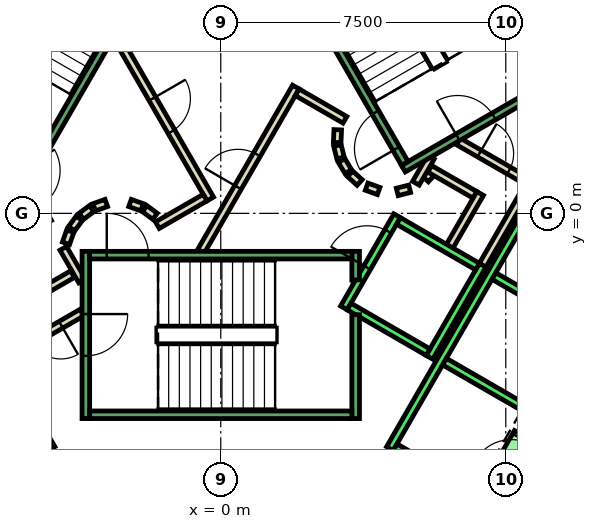
"""IFC4 building model, lengths in metres.
Left out: names, types, materials, properties, quantities, classifications, styles, units other than length and angle.
Written with IfcOpenShell. Run it as: python <this file> out.ifc"""

import sys

from ifc_helpers import new_model, si_unit, direction, frame, frame_2d, origin, place, context, subcontext, project, spatial, polyline, rectangle, outline, extrude, element, fill, save


model = new_model("IFC4")
c1 = context("Model", 3, precision=1e-05, world=origin(), true_north=direction((0.0, 1.0)))
c2 = subcontext(c1, "Body", "Model", "MODEL_VIEW")
j1 = project(units=[si_unit("LENGTHUNIT", "METRE"), si_unit("PLANEANGLEUNIT", "RADIAN")], contexts=[c1])
p1 = place(None, origin())
s1 = spatial("IfcSite", under=j1, at=p1, CompositionType="ELEMENT")
p2 = place(p1, origin())
s2 = spatial("IfcBuilding", under=s1, at=p2, CompositionType="ELEMENT")
p3 = place(p2, frame((0.0, 0.0, 72.8)))
s3 = spatial("IfcBuildingStorey", under=s2, at=p3, CompositionType="ELEMENT", Elevation=72.8)
p4 = place(p3, frame((0.0, 0.0, -0.4)))
e1 = element("IfcWall", 1, at=p4, inside=s3, PredefinedType="SHEAR", context=c2, shape_type="SweptSolid", body=[
    extrude(outline(polyline([(8.517, 11.748), (7.694, 11.273), (12.759, 2.5), (13.856, 2.5), (8.517, 11.748)])), origin(), (0.0, 0.0, 1.0), 4.2),
])
p5 = place(p3, frame((0.0, 0.0, 3.6)))
e2 = element("IfcWall", 2, at=p5, inside=s3, PredefinedType="SHEAR", context=c2, shape_type="SweptSolid", body=[
    extrude(outline(polyline([(8.767, -6.314), (7.945, -5.839), (7.295, -6.965), (8.117, -7.44), (8.767, -6.314)])), origin(), (0.0, 0.0, 1.0), 0.2),
])
p6 = place(p3, frame((5.39, 0.898, 0.0), z_axis=(0.0, 0.0, 1.0), x_axis=(0.673828488714, 0.738887791073, 0.0)))
e3 = element("IfcWall", 3, at=p6, inside=s3, PredefinedType="PARTITIONING", context=c2, shape_type="SweptSolid", body=[
    extrude(rectangle(XDim=0.263, YDim=0.2, at=frame_2d((0.131, 0.0))), origin(), (0.0, 0.0, 1.0), 3.8),
])
p7 = place(p3, frame((5.499, 1.172, 0.0), z_axis=(0.0, 0.0, 1.0), x_axis=(0.866333505267, -0.499465972466, 0.0)))
e4 = element("IfcWall", 4, at=p7, inside=s3, PredefinedType="PARTITIONING", context=c2, shape_type="SweptSolid", body=[
    extrude(rectangle(XDim=1.374, YDim=0.2, at=frame_2d((0.687, 0.0))), origin(), (0.0, 0.0, 1.0), 3.8),
])
p8 = place(p3, frame((6.826, 0.522, 0.0), z_axis=(0.0, 0.0, 1.0), x_axis=(-0.500016722714, -0.866015748706, 0.0)))
e5 = element("IfcWall", 5, at=p8, inside=s3, PredefinedType="PARTITIONING", context=c2, shape_type="SweptSolid", body=[
    extrude(rectangle(XDim=1.7, YDim=0.2, at=frame_2d((0.85, 0.0))), origin(), (0.0, 0.0, 1.0), 3.8),
])
p9 = place(p3, frame((6.25, 1.894, 0.0), z_axis=(0.0, 0.0, 1.0), x_axis=(0.866043184279, -0.499969202016, 0.0)))
e6 = element("IfcWall", 6, at=p9, inside=s3, PredefinedType="PARTITIONING", context=c2, shape_type="SweptSolid", body=[
    extrude(rectangle(XDim=2.084, YDim=0.2, at=frame_2d((1.042, 0.0))), origin(), (0.0, 0.0, 1.0), 3.8),
])
p10 = place(p9, frame((0.642, 0.0, 0.0)))
e7 = element("IfcOpeningElement", 7, at=p10, cuts=e6, PredefinedType="OPENING", context=c2, shape_type="SweptSolid", body=[
    extrude(rectangle(XDim=0.9, YDim=2.1, at=frame_2d((0.45, 1.05))), frame((0.0, 0.11, 0.0), z_axis=(0.0, -1.0, 0.0), x_axis=(1.0, 0.0, 0.0)), (0.0, 0.0, 1.0), 0.22),
])
p11 = place(p3, frame((8.192, 0.888, 0.0), z_axis=(0.0, 0.0, 1.0), x_axis=(-0.499940625693, -0.866059680843, 0.0)))
e8 = element("IfcWall", 8, at=p11, inside=s3, PredefinedType="PARTITIONING", context=c2, shape_type="SweptSolid", body=[
    extrude(rectangle(XDim=2.68, YDim=0.2, at=frame_2d((1.34, 0.0))), origin(), (0.0, 0.0, 1.0), 3.8),
])
p12 = place(p3, frame((5.135, 0.793, 0.0), z_axis=(0.0, 0.0, 1.0), x_axis=(0.499526442893, 0.866298639529, 0.0)))
e9 = element("IfcWall", 9, at=p12, inside=s3, PredefinedType="PARTITIONING", context=c2, shape_type="SweptSolid", body=[
    extrude(rectangle(XDim=0.791, YDim=0.2, at=frame_2d((0.396, 0.0))), origin(), (0.0, 0.0, 1.0), 3.8),
])
p13 = place(p3, frame((-3.9, -1.599, 0.0), z_axis=(0.0, 0.0, 1.0), x_axis=(-0.865969445389, -0.500096910261, 0.0)))
e10 = element("IfcWall", 10, at=p13, inside=s3, PredefinedType="PARTITIONING", context=c2, shape_type="SweptSolid", body=[
    extrude(rectangle(XDim=1.373, YDim=0.2, at=frame_2d((0.687, 0.0))), origin(), (0.0, 0.0, 1.0), 3.8),
])
p14 = place(p3, frame((-3.65, -2.61, 0.0), z_axis=(0.0, 0.0, 1.0), x_axis=(-0.866072462134, -0.499918483688, 0.0)))
e11 = element("IfcWall", 11, at=p14, inside=s3, PredefinedType="PARTITIONING", context=c2, shape_type="SweptSolid", body=[
    extrude(rectangle(XDim=2.084, YDim=0.2, at=frame_2d((1.042, 0.0))), origin(), (0.0, 0.0, 1.0), 3.8),
])
p15 = place(p14, frame((0.642, 0.0, 0.0)))
e12 = element("IfcOpeningElement", 12, at=p15, cuts=e11, PredefinedType="OPENING", context=c2, shape_type="SweptSolid", body=[
    extrude(rectangle(XDim=0.9, YDim=2.1, at=frame_2d((0.45, 1.05))), frame((0.0, 0.11, 0.0), z_axis=(0.0, -1.0, 0.0), x_axis=(1.0, 0.0, 0.0)), (0.0, 0.0, 1.0), 0.22),
])
p16 = place(p3, frame((-4.145, -0.92, 0.0), z_axis=(0.0, 0.0, 1.0), x_axis=(0.499743786207, -0.866173278362, 0.0)))
e13 = element("IfcWall", 13, at=p16, inside=s3, PredefinedType="PARTITIONING", context=c2, shape_type="SweptSolid", body=[
    extrude(rectangle(XDim=0.991, YDim=0.2, at=frame_2d((0.495, 0.0))), origin(), (0.0, 0.0, 1.0), 3.8),
])
p17 = place(p3, frame((-0.52, -1.0, 0.0), z_axis=(0.0, 0.0, 1.0), x_axis=(0.50011622646, 0.865958290007, 0.0)))
e14 = element("IfcWall", 14, at=p17, inside=s3, PredefinedType="PARTITIONING", context=c2, shape_type="SweptSolid", body=[
    extrude(rectangle(XDim=4.991, YDim=0.2, at=frame_2d((2.496, 0.0))), origin(), (0.0, 0.0, 1.0), 3.8),
])
p18 = place(p17, frame((1.945, 0.0, 0.0)))
e15 = element("IfcOpeningElement", 15, at=p18, cuts=e14, PredefinedType="OPENING", context=c2, shape_type="SweptSolid", body=[
    extrude(rectangle(XDim=1.0, YDim=2.1, at=frame_2d((0.5, 1.05))), frame((0.0, 0.11, 0.0), z_axis=(0.0, -1.0, 0.0), x_axis=(1.0, 0.0, 0.0)), (0.0, 0.0, 1.0), 0.22),
])
p19 = place(p3, frame((2.012, 3.186, 0.0), z_axis=(0.0, 0.0, 1.0), x_axis=(0.865891012941, -0.500232699559, 0.0)))
e16 = element("IfcWall", 16, at=p19, inside=s3, PredefinedType="PARTITIONING", context=c2, shape_type="SweptSolid", body=[
    extrude(rectangle(XDim=1.449, YDim=0.2, at=frame_2d((0.725, 0.0))), origin(), (0.0, 0.0, 1.0), 3.8),
])
p20 = place(p3, frame((3.079, 2.199, 0.0), z_axis=(0.0, 0.0, 1.0), x_axis=(-0.047771483479, -0.998858290933, 0.0)))
e17 = element("IfcWall", 17, at=p20, inside=s3, PredefinedType="PARTITIONING", context=c2, shape_type="SweptSolid", body=[
    extrude(rectangle(XDim=0.337, YDim=0.2, at=frame_2d((0.169, 0.0))), origin(), (0.0, 0.0, 1.0), 3.8),
])
p21 = place(p3, frame((3.07, 1.786, 0.0), z_axis=(0.0, 0.0, 1.0), x_axis=(0.242705583207, -0.970099994784, 0.0)))
e18 = element("IfcWall", 18, at=p21, inside=s3, PredefinedType="PARTITIONING", context=c2, shape_type="SweptSolid", body=[
    extrude(rectangle(XDim=0.338, YDim=0.2, at=frame_2d((0.169, 0.0))), origin(), (0.0, 0.0, 1.0), 3.8),
])
for number, where, z_axis, x_axis in (
    (19, (3.182, 1.388, 0.0), (0.0, 0.0, 1.0), (0.512, -0.859, 0.0)),
    (20, (3.404, 1.039, 0.0), (0.0, 0.0, 1.0), (0.74, -0.672, 0.0)),
):
    element("IfcWall", number, at=place(p3, frame(where, z_axis=z_axis, x_axis=x_axis)), inside=s3, PredefinedType="PARTITIONING", context=c2, shape_type="SweptSolid", body=[
        extrude(rectangle(XDim=0.338, YDim=0.2, at=frame_2d((0.169, 0.0))), origin(), (0.0, 0.0, 1.0), 3.8),
    ])
p22 = place(p3, frame((3.838, 0.702, 0.0), z_axis=(0.0, 0.0, 1.0), x_axis=(0.941035081519, -0.338308993895, 0.0)))
e21 = element("IfcWall", 21, at=p22, inside=s3, PredefinedType="PARTITIONING", context=c2, shape_type="SweptSolid", body=[
    extrude(rectangle(XDim=0.337, YDim=0.2, at=frame_2d((0.168, 0.0))), origin(), (0.0, 0.0, 1.0), 3.8),
])
p23 = place(p3, frame((4.644, 0.564, 0.0), z_axis=(0.0, 0.0, 1.0), x_axis=(0.969929076366, 0.243387729394, 0.0)))
e22 = element("IfcWall", 22, at=p23, inside=s3, PredefinedType="PARTITIONING", context=c2, shape_type="SweptSolid", body=[
    extrude(rectangle(XDim=0.337, YDim=0.2, at=frame_2d((0.168, 0.0))), origin(), (0.0, 0.0, 1.0), 3.8),
])
p24 = place(p3, frame((-2.771, 4.7, 0.0), z_axis=(0.0, 0.0, 1.0), x_axis=(0.499969479948, -0.866043023828, 0.0)))
e23 = element("IfcWall", 23, at=p24, inside=s3, PredefinedType="PARTITIONING", context=c2, shape_type="SweptSolid", body=[
    extrude(rectangle(XDim=4.99, YDim=0.2, at=frame_2d((2.495, 0.0))), origin(), (0.0, 0.0, 1.0), 3.8),
])
p25 = place(p24, frame((1.945, 0.0, 0.0)))
e24 = element("IfcOpeningElement", 24, at=p25, cuts=e23, PredefinedType="OPENING", context=c2, shape_type="SweptSolid", body=[
    extrude(rectangle(XDim=1.0, YDim=2.1, at=frame_2d((0.5, 1.05))), frame((0.0, 0.11, 0.0), z_axis=(0.0, -1.0, 0.0), x_axis=(1.0, 0.0, 0.0)), (0.0, 0.0, 1.0), 0.22),
])
p26 = place(p3, frame((-0.412, 0.414, 0.0), z_axis=(0.0, 0.0, 1.0), x_axis=(-0.866017369001, -0.500013916395, 0.0)))
e25 = element("IfcWall", 25, at=p26, inside=s3, PredefinedType="PARTITIONING", context=c2, shape_type="SweptSolid", body=[
    extrude(rectangle(XDim=1.45, YDim=0.2, at=frame_2d((0.725, 0.0))), origin(), (0.0, 0.0, 1.0), 3.8),
])
p27 = place(p3, frame((-1.731, -0.077, 0.0), z_axis=(0.0, 0.0, 1.0), x_axis=(-0.804311165252, 0.594208338422, 0.0)))
e26 = element("IfcWall", 26, at=p27, inside=s3, PredefinedType="PARTITIONING", context=c2, shape_type="SweptSolid", body=[
    extrude(rectangle(XDim=0.338, YDim=0.2, at=frame_2d((0.169, 0.0))), origin(), (0.0, 0.0, 1.0), 3.8),
])
p28 = place(p3, frame((-2.07, 0.16, 0.0), z_axis=(0.0, 0.0, 1.0), x_axis=(-0.942199461132, 0.335052496547, 0.0)))
e27 = element("IfcWall", 27, at=p28, inside=s3, PredefinedType="PARTITIONING", context=c2, shape_type="SweptSolid", body=[
    extrude(rectangle(XDim=0.337, YDim=0.2, at=frame_2d((0.169, 0.0))), origin(), (0.0, 0.0, 1.0), 3.8),
])
p29 = place(p3, frame((-3.012, 0.273, 0.0), z_axis=(0.0, 0.0, 1.0), x_axis=(-0.942280615813, -0.334824194261, 0.0)))
e28 = element("IfcWall", 28, at=p29, inside=s3, PredefinedType="PARTITIONING", context=c2, shape_type="SweptSolid", body=[
    extrude(rectangle(XDim=0.338, YDim=0.2, at=frame_2d((0.169, 0.0))), origin(), (0.0, 0.0, 1.0), 3.8),
])
p30 = place(p3, frame((-3.397, 0.124, 0.0), z_axis=(0.0, 0.0, 1.0), x_axis=(-0.804311165252, -0.594208338422, 0.0)))
e29 = element("IfcWall", 29, at=p30, inside=s3, PredefinedType="PARTITIONING", context=c2, shape_type="SweptSolid", body=[
    extrude(rectangle(XDim=0.338, YDim=0.2, at=frame_2d((0.169, 0.0))), origin(), (0.0, 0.0, 1.0), 3.8),
])
p31 = place(p3, frame((-3.723, -0.131, 0.0), z_axis=(0.0, 0.0, 1.0), x_axis=(-0.594675113454, -0.803966112121, 0.0)))
e30 = element("IfcWall", 30, at=p31, inside=s3, PredefinedType="PARTITIONING", context=c2, shape_type="SweptSolid", body=[
    extrude(rectangle(XDim=0.338, YDim=0.2, at=frame_2d((0.169, 0.0))), origin(), (0.0, 0.0, 1.0), 3.8),
])
p32 = place(p3, frame((-3.96, -0.47, 0.0), z_axis=(0.0, 0.0, 1.0), x_axis=(-0.334824194261, -0.942280615813, 0.0)))
e31 = element("IfcWall", 31, at=p32, inside=s3, PredefinedType="PARTITIONING", context=c2, shape_type="SweptSolid", body=[
    extrude(rectangle(XDim=0.338, YDim=0.2, at=frame_2d((0.169, 0.0))), origin(), (0.0, 0.0, 1.0), 3.8),
])
p33 = place(p3, frame((-9.751, 2.99, 0.0), z_axis=(0.0, 0.0, 1.0), x_axis=(0.50000090737, -0.866024879913, 0.0)))
e32 = element("IfcWall", 32, at=p33, inside=s3, PredefinedType="STANDARD", context=c2, shape_type="SweptSolid", body=[
    extrude(rectangle(XDim=10.6, YDim=0.2, at=frame_2d((5.3, 0.0))), origin(), (0.0, 0.0, 1.0), 3.8),
])
p34 = place(p3, frame((3.24, -2.488, 0.0), z_axis=(0.0, 0.0, 1.0), x_axis=(0.49994636267, 0.866056369097, 0.0)))
e33 = element("IfcWall", 33, at=p34, inside=s3, PredefinedType="STANDARD", context=c2, shape_type="SweptSolid", body=[
    extrude(rectangle(XDim=2.8, YDim=0.2, at=frame_2d((1.4, 0.0))), origin(), (0.0, 0.0, 1.0), 3.8),
])
p35 = place(p34, frame((1.225, 0.0, 0.0)))
e34 = element("IfcOpeningElement", 34, at=p35, cuts=e33, PredefinedType="OPENING", context=c2, shape_type="SweptSolid", body=[
    extrude(rectangle(XDim=1.1, YDim=2.1, at=frame_2d((0.55, 1.05))), frame((0.0, 0.11, 0.0), z_axis=(0.0, -1.0, 0.0), x_axis=(1.0, 0.0, 0.0)), (0.0, 0.0, 1.0), 0.22),
])
p36 = place(p3, frame((5.492, -3.788, 0.0), z_axis=(0.0, 0.0, 1.0), x_axis=(0.500011755427, 0.866018616679, 0.0)))
e35 = element("IfcWall", 35, at=p36, inside=s3, PredefinedType="STANDARD", context=c2, shape_type="SweptSolid", body=[
    extrude(rectangle(XDim=2.8, YDim=0.2, at=frame_2d((1.4, 0.0))), origin(), (0.0, 0.0, 1.0), 3.8),
])
p37 = place(p3, frame((3.377, -2.452, 0.0), z_axis=(0.0, 0.0, 1.0), x_axis=(0.865955154139, -0.50012165622, 0.0)))
e36 = element("IfcWall", 36, at=p37, inside=s3, PredefinedType="STANDARD", context=c2, shape_type="SweptSolid", body=[
    extrude(rectangle(XDim=2.4, YDim=0.2, at=frame_2d((1.2, 0.0))), origin(), (0.0, 0.0, 1.0), 3.8),
])
p38 = place(p3, frame((4.677, -0.2, 0.0), z_axis=(0.0, 0.0, 1.0), x_axis=(0.865973769406, -0.500089422704, 0.0)))
e37 = element("IfcWall", 37, at=p38, inside=s3, PredefinedType="STANDARD", context=c2, shape_type="SweptSolid", body=[
    extrude(rectangle(XDim=2.399, YDim=0.2, at=frame_2d((1.2, 0.0))), origin(), (0.0, 0.0, 1.0), 3.8),
])
p39 = place(p3, frame((4.451, -6.19, 0.0), z_axis=(0.0, 0.0, 1.0), x_axis=(0.50000090737, 0.866024879913, 0.0)))
e38 = element("IfcWall", 38, at=p39, inside=s3, PredefinedType="STANDARD", context=c2, shape_type="SweptSolid", body=[
    extrude(rectangle(XDim=10.6, YDim=0.2, at=frame_2d((5.3, 0.0))), origin(), (0.0, 0.0, 1.0), 3.8),
])
for number, where, z_axis, x_axis in (
    (39, (4.588, -6.153, 0.0), (0.0, 0.0, 1.0), (0.866, -0.5, 0.0)),
    (40, (5.888, -3.902, 0.0), (0.0, 0.0, 1.0), (0.866, -0.5, 0.0)),
    (41, (7.188, -1.65, 0.0), (0.0, 0.0, 1.0), (0.866, -0.5, 0.0)),
):
    element("IfcWall", number, at=place(p3, frame(where, z_axis=z_axis, x_axis=x_axis)), inside=s3, PredefinedType="STANDARD", context=c2, shape_type="SweptSolid", body=[
        extrude(rectangle(XDim=2.5, YDim=0.2, at=frame_2d((1.25, 0.0))), origin(), (0.0, 0.0, 1.0), 3.8),
    ])
p40 = place(p3, frame((7.598, -7.14, 0.0), z_axis=(0.0, 0.0, 1.0), x_axis=(0.500362116554, 0.865816234728, 0.0)))
e42 = element("IfcWall", 42, at=p40, inside=s3, PredefinedType="STANDARD", context=c2, shape_type="SweptSolid", body=[
    extrude(rectangle(XDim=1.299, YDim=1.2, at=frame_2d((0.65, 0.0))), origin(), (0.0, 0.0, 1.0), 2.4),
])
p41 = place(p40, frame((0.1, 0.0, 0.0)))
e43 = element("IfcOpeningElement", 43, at=p41, cuts=e42, PredefinedType="OPENING", context=c2, shape_type="SweptSolid", body=[
    extrude(rectangle(XDim=1.1, YDim=2.3, at=frame_2d((0.55, 1.15))), frame((0.0, 0.61, 0.0), z_axis=(0.0, -1.0, 0.0), x_axis=(1.0, 0.0, 0.0)), (0.0, 0.0, 1.0), 1.22),
])
p42 = place(p3, frame((-3.55, -1.0, 0.0), z_axis=(0.0, 0.0, 1.0), x_axis=(0.0, -1.0, 0.0)))
e44 = element("IfcWall", 44, at=p42, inside=s3, PredefinedType="STANDARD", context=c2, shape_type="SweptSolid", body=[
    extrude(rectangle(XDim=4.4, YDim=0.2, at=frame_2d((2.2, 0.0))), origin(), (0.0, 0.0, 1.0), 3.8),
])
p43 = place(p42, frame((1.65, 0.0, 0.0)))
e45 = element("IfcOpeningElement", 45, at=p43, cuts=e44, PredefinedType="OPENING", context=c2, shape_type="SweptSolid", body=[
    extrude(rectangle(XDim=1.1, YDim=2.2, at=frame_2d((0.55, 1.1))), frame((0.0, 0.11, 0.0), z_axis=(0.0, -1.0, 0.0), x_axis=(1.0, 0.0, 0.0)), (0.0, 0.0, 1.0), 0.22),
])
p44 = place(p3, frame((3.55, -2.667, 0.0), z_axis=(0.0, 0.0, 1.0), x_axis=(0.0, -1.0, 0.0)))
e46 = element("IfcWall", 46, at=p44, inside=s3, PredefinedType="STANDARD", context=c2, shape_type="SweptSolid", body=[
    extrude(rectangle(XDim=2.733, YDim=0.2, at=frame_2d((1.366, 0.0))), origin(), (0.0, 0.0, 1.0), 3.8),
])
p45 = place(p3, frame((3.55, -1.0, 0.0), z_axis=(0.0, 0.0, 1.0), x_axis=(0.0, -1.0, 0.0)))
e47 = element("IfcWall", 47, at=p45, inside=s3, PredefinedType="STANDARD", context=c2, shape_type="SweptSolid", body=[
    extrude(rectangle(XDim=0.751, YDim=0.2, at=frame_2d((0.375, 0.0))), origin(), (0.0, 0.0, 1.0), 3.8),
])
p46 = place(p3, frame((-3.45, -1.1, 0.0), z_axis=(0.0, 0.0, 1.0), x_axis=(1.0, 0.0, 0.0)))
e48 = element("IfcWall", 48, at=p46, inside=s3, PredefinedType="STANDARD", context=c2, shape_type="SweptSolid", body=[
    extrude(rectangle(XDim=6.9, YDim=0.2, at=frame_2d((3.45, 0.0))), origin(), (0.0, 0.0, 1.0), 3.8),
])
p47 = place(p46, frame((0.45, 0.0, 0.0)))
e49 = element("IfcOpeningElement", 49, at=p47, cuts=e48, PredefinedType="OPENING", context=c2, shape_type="SweptSolid", body=[
    extrude(rectangle(XDim=1.1, YDim=2.2, at=frame_2d((0.55, 1.1))), frame((0.0, 0.11, 0.0), z_axis=(0.0, -1.0, 0.0), x_axis=(1.0, 0.0, 0.0)), (0.0, 0.0, 1.0), 0.22),
])
p48 = place(p3, frame((-3.45, -5.3, 0.0), z_axis=(0.0, 0.0, 1.0), x_axis=(1.0, 0.0, 0.0)))
e50 = element("IfcWall", 50, at=p48, inside=s3, PredefinedType="STANDARD", context=c2, shape_type="SweptSolid", body=[
    extrude(rectangle(XDim=6.9, YDim=0.2, at=frame_2d((3.45, 0.0))), origin(), (0.0, 0.0, 1.0), 3.8),
])
p49 = place(p3, frame((4.806, 1.176, 0.0), z_axis=(0.0, 0.0, 1.0), x_axis=(0.866059941101, 0.499940174841, 0.0)))
e51 = element("IfcWall", 51, at=p49, inside=s3, PredefinedType="STANDARD", context=c2, shape_type="SweptSolid", body=[
    extrude(rectangle(XDim=4.4, YDim=0.2, at=frame_2d((2.2, 0.0))), origin(), (0.0, 0.0, 1.0), 3.8),
])
p50 = place(p49, frame((1.65, 0.0, 0.0)))
e52 = element("IfcOpeningElement", 52, at=p50, cuts=e51, PredefinedType="OPENING", context=c2, shape_type="SweptSolid", body=[
    extrude(rectangle(XDim=1.1, YDim=2.2, at=frame_2d((0.55, 1.1))), frame((0.0, 0.11, 0.0), z_axis=(0.0, -1.0, 0.0), x_axis=(1.0, 0.0, 0.0)), (0.0, 0.0, 1.0), 0.22),
])
p51 = place(p3, frame((4.843, 1.312, 0.0), z_axis=(0.0, 0.0, 1.0), x_axis=(-0.499963383562, 0.866046543262, 0.0)))
e53 = element("IfcWall", 53, at=p51, inside=s3, PredefinedType="STANDARD", context=c2, shape_type="SweptSolid", body=[
    extrude(rectangle(XDim=6.9, YDim=0.2, at=frame_2d((3.45, 0.0))), origin(), (0.0, 0.0, 1.0), 3.8),
])
p52 = place(p51, frame((0.45, 0.0, 0.0)))
e54 = element("IfcOpeningElement", 54, at=p52, cuts=e53, PredefinedType="OPENING", context=c2, shape_type="SweptSolid", body=[
    extrude(rectangle(XDim=1.1, YDim=2.2, at=frame_2d((0.55, 1.1))), frame((0.0, 0.11, 0.0), z_axis=(0.0, -1.0, 0.0), x_axis=(1.0, 0.0, 0.0)), (0.0, 0.0, 1.0), 0.22),
])
p53 = place(p3, frame((8.48, 3.412, 0.0), z_axis=(0.0, 0.0, 1.0), x_axis=(-0.499978703459, 0.866037698999, 0.0)))
e55 = element("IfcWall", 55, at=p53, inside=s3, PredefinedType="STANDARD", context=c2, shape_type="SweptSolid", body=[
    extrude(rectangle(XDim=6.9, YDim=0.2, at=frame_2d((3.45, 0.0))), origin(), (0.0, 0.0, 1.0), 3.8),
])
p54 = place(p3, frame((-1.393, 7.288, 0.0), z_axis=(0.0, 0.0, 1.0), x_axis=(-0.499963383562, -0.866046543262, 0.0)))
e56 = element("IfcWall", 56, at=p54, inside=s3, PredefinedType="STANDARD", context=c2, shape_type="SweptSolid", body=[
    extrude(rectangle(XDim=6.9, YDim=0.2, at=frame_2d((3.45, 0.0))), origin(), (0.0, 0.0, 1.0), 3.8),
])
p55 = place(p54, frame((0.45, 0.0, 0.0)))
e57 = element("IfcOpeningElement", 57, at=p55, cuts=e56, PredefinedType="OPENING", context=c2, shape_type="SweptSolid", body=[
    extrude(rectangle(XDim=1.1, YDim=2.2, at=frame_2d((0.55, 1.1))), frame((0.0, 0.11, 0.0), z_axis=(0.0, -1.0, 0.0), x_axis=(1.0, 0.0, 0.0)), (0.0, 0.0, 1.0), 0.22),
])
p56 = place(p18, origin())
e58 = element("IfcDoor", 58, at=p56, inside=s3, OperationType="SINGLE_SWING_LEFT", PredefinedType="DOOR", context=c2, shape_type="SweptSolid", body=[
    extrude(rectangle(XDim=1.0, YDim=2.1, at=frame_2d((0.5, 1.05))), frame((0.0, 0.025, 0.0), z_axis=(0.0, -1.0, 0.0), x_axis=(1.0, 0.0, 0.0)), (0.0, 0.0, 1.0), 0.05),
])
fill(e15, e58)
p57 = place(p25, origin())
e59 = element("IfcDoor", 59, at=p57, inside=s3, OperationType="SINGLE_SWING_RIGHT", PredefinedType="DOOR", context=c2, shape_type="SweptSolid", body=[
    extrude(rectangle(XDim=1.0, YDim=2.1, at=frame_2d((0.5, 1.05))), frame((0.0, 0.025, 0.0), z_axis=(0.0, -1.0, 0.0), x_axis=(1.0, 0.0, 0.0)), (0.0, 0.0, 1.0), 0.05),
])
fill(e24, e59)
p58 = place(p10, origin())
e60 = element("IfcDoor", 60, at=p58, inside=s3, OperationType="SINGLE_SWING_LEFT", PredefinedType="DOOR", context=c2, shape_type="SweptSolid", body=[
    extrude(rectangle(XDim=0.9, YDim=2.1, at=frame_2d((0.45, 1.05))), frame((0.0, 0.025, 0.0), z_axis=(0.0, -1.0, 0.0), x_axis=(1.0, 0.0, 0.0)), (0.0, 0.0, 1.0), 0.05),
])
fill(e7, e60)
p59 = place(p15, origin())
e61 = element("IfcDoor", 61, at=p59, inside=s3, OperationType="SINGLE_SWING_LEFT", PredefinedType="DOOR", context=c2, shape_type="SweptSolid", body=[
    extrude(rectangle(XDim=0.9, YDim=2.1, at=frame_2d((0.45, 1.05))), frame((0.0, 0.025, 0.0), z_axis=(0.0, -1.0, 0.0), x_axis=(1.0, 0.0, 0.0)), (0.0, 0.0, 1.0), 0.05),
])
fill(e12, e61)
p60 = place(p41, origin())
e62 = element("IfcDoor", 62, at=p60, inside=s3, OperationType="SLIDING_TO_LEFT", PredefinedType="DOOR", context=c2, shape_type="SweptSolid", body=[
    extrude(rectangle(XDim=1.1, YDim=2.3, at=frame_2d((0.55, 1.15))), frame((0.0, 0.025, 0.0), z_axis=(0.0, -1.0, 0.0), x_axis=(1.0, 0.0, 0.0)), (0.0, 0.0, 1.0), 0.05),
])
fill(e43, e62)
p61 = place(p35, origin())
e63 = element("IfcDoor", 63, at=p61, inside=s3, OperationType="SLIDING_TO_LEFT", PredefinedType="DOOR", context=c2, shape_type="SweptSolid", body=[
    extrude(rectangle(XDim=1.1, YDim=2.1, at=frame_2d((0.55, 1.05))), frame((0.0, 0.025, 0.0), z_axis=(0.0, -1.0, 0.0), x_axis=(1.0, 0.0, 0.0)), (0.0, 0.0, 1.0), 0.05),
])
fill(e34, e63)
p62 = place(p47, origin())
e64 = element("IfcDoor", 64, at=p62, inside=s3, OperationType="SINGLE_SWING_LEFT", PredefinedType="DOOR", context=c2, shape_type="SweptSolid", body=[
    extrude(rectangle(XDim=1.1, YDim=2.2, at=frame_2d((0.55, 1.1))), frame((0.0, 0.025, 0.0), z_axis=(0.0, -1.0, 0.0), x_axis=(1.0, 0.0, 0.0)), (0.0, 0.0, 1.0), 0.05),
])
fill(e49, e64)
p63 = place(p43, origin())
e65 = element("IfcDoor", 65, at=p63, inside=s3, OperationType="SINGLE_SWING_LEFT", PredefinedType="DOOR", context=c2, shape_type="SweptSolid", body=[
    extrude(rectangle(XDim=1.1, YDim=2.2, at=frame_2d((0.55, 1.1))), frame((0.0, 0.025, 0.0), z_axis=(0.0, -1.0, 0.0), x_axis=(1.0, 0.0, 0.0)), (0.0, 0.0, 1.0), 0.05),
])
fill(e45, e65)
p64 = place(p52, origin())
e66 = element("IfcDoor", 66, at=p64, inside=s3, OperationType="SINGLE_SWING_LEFT", PredefinedType="DOOR", context=c2, shape_type="SweptSolid", body=[
    extrude(rectangle(XDim=1.1, YDim=2.2, at=frame_2d((0.55, 1.1))), frame((0.0, 0.025, 0.0), z_axis=(0.0, -1.0, 0.0), x_axis=(1.0, 0.0, 0.0)), (0.0, 0.0, 1.0), 0.05),
])
fill(e54, e66)
p65 = place(p50, origin())
e67 = element("IfcDoor", 67, at=p65, inside=s3, OperationType="SINGLE_SWING_LEFT", PredefinedType="DOOR", context=c2, shape_type="SweptSolid", body=[
    extrude(rectangle(XDim=1.1, YDim=2.2, at=frame_2d((0.55, 1.1))), frame((0.0, 0.025, 0.0), z_axis=(0.0, -1.0, 0.0), x_axis=(1.0, 0.0, 0.0)), (0.0, 0.0, 1.0), 0.05),
])
fill(e52, e67)
save(model, sys.argv[1])
